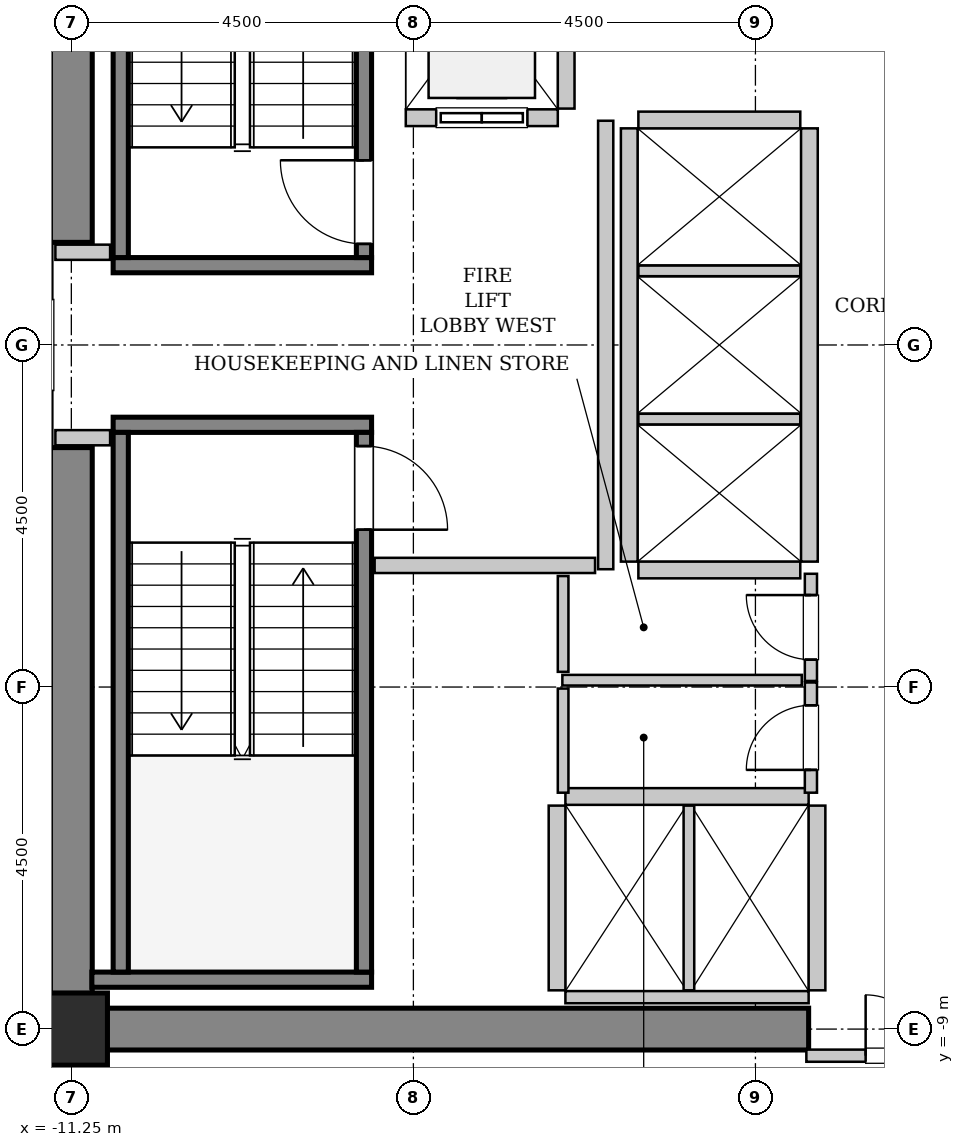
"""IFC4 building model, lengths in metres.
Left out: names, types, materials, properties, quantities, classifications, styles, units other than length and angle.
Written with IfcOpenShell. Run it as: python <this file> out.ifc"""

import sys

from ifc_helpers import new_model, si_unit, direction, frame, frame_2d, origin, origin_2d, place, context, subcontext, project, spatial, rectangle, hollow_rectangle, extrude, source, transform, mapped, element, fill, save


model = new_model("IFC4")
c1 = context("Model", 3, precision=1e-05, world=origin(), true_north=direction((0.0, 1.0)))
c2 = subcontext(c1, "Body", "Model", "MODEL_VIEW")
j1 = project(units=[si_unit("LENGTHUNIT", "METRE"), si_unit("PLANEANGLEUNIT", "RADIAN")], contexts=[c1])
p1 = place(None, origin())
s1 = spatial("IfcSite", under=j1, at=p1, CompositionType="ELEMENT")
p2 = place(p1, origin())
s2 = spatial("IfcBuilding", under=s1, at=p2, CompositionType="ELEMENT")
p3 = place(p2, frame((0.0, 0.0, 94.6)))
s3 = spatial("IfcBuildingStorey", under=s2, at=p3, CompositionType="ELEMENT", Elevation=94.6)
m1 = source(origin(), c2, "Body", "SweptSolid", [
    extrude(rectangle(XDim=9.975, YDim=0.55, at=frame_2d((4.987, 0.0))), origin(), (0.0, 0.0, 1.0), 3.8),
])
p4 = place(p3, frame((-11.525, -9.0, 0.0), z_axis=(0.0, 0.0, 1.0), x_axis=(1.0, 0.0, 0.0)))
e1 = element("IfcWall", 1, at=p4, inside=s3, PredefinedType="SHEAR", context=c2, shape_type="MappedRepresentation", body=[
    mapped(m1, transform((0.0, 0.0, 0.0), x_axis=(1.0, 0.0, 0.0), y_axis=(0.0, 1.0, 0.0), z_axis=(0.0, 0.0, 1.0), scale=1.0)),
])
m2 = source(origin(), c2, "Body", "SweptSolid", [
    extrude(rectangle(XDim=7.375, YDim=0.55, at=frame_2d((3.688, 0.0))), origin(), (0.0, 0.0, 1.0), 3.8),
])
for number, where, z_axis, x_axis in (
    (2, (-11.25, -8.725, 0.0), (0.0, 0.0, 1.0), (0.0, 1.0, 0.0)),
    (3, (-11.25, 1.35, 0.0), (0.0, 0.0, 1.0), (0.0, 1.0, 0.0)),
):
    element("IfcWall", number, at=place(p3, frame(where, z_axis=z_axis, x_axis=x_axis)), inside=s3, PredefinedType="SHEAR", context=c2, shape_type="MappedRepresentation", body=[
        mapped(m2, transform((0.0, 0.0, 0.0), x_axis=(1.0, 0.0, 0.0), y_axis=(0.0, 1.0, 0.0), z_axis=(0.0, 0.0, 1.0), scale=1.0)),
    ])
m3 = source(origin(), c2, "Body", "SweptSolid", [
    extrude(hollow_rectangle(XDim=0.95, YDim=0.95, WallThickness=0.045, InnerFilletRadius=0.045, OuterFilletRadius=0.09, at=origin_2d()), origin(), (0.0, 0.0, 1.0), 3.8),
])
p5 = place(p3, frame((-11.25, -9.0, 0.0), z_axis=(0.0, 0.0, 1.0), x_axis=(1.0, 0.0, 0.0)))
e4 = element("IfcColumn", 4, at=p5, inside=s3, PredefinedType="COLUMN", context=c2, shape_type="MappedRepresentation", body=[
    mapped(m3, transform((0.0, 0.0, 0.0), x_axis=(1.0, 0.0, 0.0), y_axis=(0.0, 1.0, 0.0), z_axis=(0.0, 0.0, 1.0), scale=1.0)),
])
m4 = source(origin(), c2, "Body", "SweptSolid", [
    extrude(rectangle(XDim=3.4, YDim=0.2, at=frame_2d((1.7, 0.0))), origin(), (0.0, 0.0, 1.0), 3.8),
])
p6 = place(p3, frame((-7.3, 1.05, 0.0), z_axis=(0.0, 0.0, 1.0), x_axis=(-1.0, 0.0, 0.0)))
e5 = element("IfcWall", 5, at=p6, inside=s3, PredefinedType="SOLIDWALL", context=c2, shape_type="MappedRepresentation", body=[
    mapped(m4, transform((0.0, 0.0, 0.0), x_axis=(1.0, 0.0, 0.0), y_axis=(0.0, 1.0, 0.0), z_axis=(0.0, 0.0, 1.0), scale=1.0)),
])
m5 = source(origin(), c2, "Body", "SweptSolid", [
    extrude(rectangle(XDim=7.1, YDim=0.2, at=frame_2d((3.55, 0.0))), origin(), (0.0, 0.0, 1.0), 3.8),
])
p7 = place(p3, frame((-7.4, 1.15, 0.0), z_axis=(0.0, 0.0, 1.0), x_axis=(0.0, 1.0, 0.0)))
e6 = element("IfcWall", 6, at=p7, inside=s3, PredefinedType="SOLIDWALL", context=c2, shape_type="MappedRepresentation", body=[
    mapped(m5, transform((0.0, 0.0, 0.0), x_axis=(1.0, 0.0, 0.0), y_axis=(0.0, 1.0, 0.0), z_axis=(0.0, 0.0, 1.0), scale=1.0)),
])
p8 = place(p7, frame((0.18, 0.0, 0.0)))
e7 = element("IfcOpeningElement", 7, at=p8, cuts=e6, PredefinedType="OPENING", context=c2, shape_type="SweptSolid", body=[
    extrude(rectangle(XDim=1.1, YDim=2.15, at=frame_2d((0.55, 1.075))), frame((0.0, 0.11, 0.0), z_axis=(0.0, -1.0, 0.0), x_axis=(1.0, 0.0, 0.0)), (0.0, 0.0, 1.0), 0.22),
])
p9 = place(p3, frame((-10.6, 1.15, 0.0), z_axis=(0.0, 0.0, 1.0), x_axis=(0.0, 1.0, 0.0)))
e8 = element("IfcWall", 8, at=p9, inside=s3, PredefinedType="SOLIDWALL", context=c2, shape_type="MappedRepresentation", body=[
    mapped(m5, transform((0.0, 0.0, 0.0), x_axis=(1.0, 0.0, 0.0), y_axis=(0.0, 1.0, 0.0), z_axis=(0.0, 0.0, 1.0), scale=1.0)),
])
p10 = place(p3, frame((-10.7, -1.05, 0.0), z_axis=(0.0, 0.0, 1.0), x_axis=(1.0, 0.0, 0.0)))
e9 = element("IfcWall", 9, at=p10, inside=s3, PredefinedType="SOLIDWALL", context=c2, shape_type="MappedRepresentation", body=[
    mapped(m4, transform((0.0, 0.0, 0.0), x_axis=(1.0, 0.0, 0.0), y_axis=(0.0, 1.0, 0.0), z_axis=(0.0, 0.0, 1.0), scale=1.0)),
])
m6 = source(origin(), c2, "Body", "SweptSolid", [
    extrude(rectangle(XDim=3.68, YDim=0.2, at=frame_2d((1.84, 0.0))), origin(), (0.0, 0.0, 1.0), 3.8),
])
p11 = place(p3, frame((-10.98, -8.35, 0.0), z_axis=(0.0, 0.0, 1.0), x_axis=(1.0, 0.0, 0.0)))
e10 = element("IfcWall", 10, at=p11, inside=s3, PredefinedType="SOLIDWALL", context=c2, shape_type="MappedRepresentation", body=[
    mapped(m6, transform((0.0, 0.0, 0.0), x_axis=(1.0, 0.0, 0.0), y_axis=(0.0, 1.0, 0.0), z_axis=(0.0, 0.0, 1.0), scale=1.0)),
])
p12 = place(p3, frame((-10.6, -1.15, 0.0), z_axis=(0.0, 0.0, 1.0), x_axis=(0.0, -1.0, 0.0)))
e11 = element("IfcWall", 11, at=p12, inside=s3, PredefinedType="SOLIDWALL", context=c2, shape_type="MappedRepresentation", body=[
    mapped(m5, transform((0.0, 0.0, 0.0), x_axis=(1.0, 0.0, 0.0), y_axis=(0.0, 1.0, 0.0), z_axis=(0.0, 0.0, 1.0), scale=1.0)),
])
p13 = place(p3, frame((-7.4, -1.15, 0.0), z_axis=(0.0, 0.0, 1.0), x_axis=(0.0, -1.0, 0.0)))
e12 = element("IfcWall", 12, at=p13, inside=s3, PredefinedType="SOLIDWALL", context=c2, shape_type="MappedRepresentation", body=[
    mapped(m5, transform((0.0, 0.0, 0.0), x_axis=(1.0, 0.0, 0.0), y_axis=(0.0, 1.0, 0.0), z_axis=(0.0, 0.0, 1.0), scale=1.0)),
])
p14 = place(p13, frame((0.18, 0.0, 0.0)))
e13 = element("IfcOpeningElement", 13, at=p14, cuts=e12, PredefinedType="OPENING", context=c2, shape_type="SweptSolid", body=[
    extrude(rectangle(XDim=1.1, YDim=2.15, at=frame_2d((0.55, 1.075))), frame((0.0, 0.11, 0.0), z_axis=(0.0, -1.0, 0.0), x_axis=(1.0, 0.0, 0.0)), (0.0, 0.0, 1.0), 0.22),
])
m7 = source(origin(), c2, "Body", "SweptSolid", [
    extrude(rectangle(XDim=2.0, YDim=0.22, at=frame_2d((1.0, 0.0))), origin(), (0.0, 0.0, 1.0), 3.535),
])
p15 = place(p3, frame((-6.85, 2.99, 0.0), z_axis=(0.0, 0.0, 1.0), x_axis=(1.0, 0.0, 0.0)))
e14 = element("IfcWall", 14, at=p15, inside=s3, PredefinedType="SOLIDWALL", context=c2, shape_type="MappedRepresentation", body=[
    mapped(m7, transform((0.0, 0.0, 0.0), x_axis=(1.0, 0.0, 0.0), y_axis=(0.0, 1.0, 0.0), z_axis=(0.0, 0.0, 1.0), scale=1.0)),
])
p16 = place(p15, frame((0.4, 0.0, 0.0)))
e15 = element("IfcOpeningElement", 15, at=p16, cuts=e14, PredefinedType="OPENING", context=c2, shape_type="SweptSolid", body=[
    extrude(rectangle(XDim=1.2, YDim=2.2, at=frame_2d((0.6, 1.1))), frame((0.0, 0.12, 0.0), z_axis=(0.0, -1.0, 0.0), x_axis=(1.0, 0.0, 0.0)), (0.0, 0.0, 1.0), 0.24),
])
m8 = source(origin(), c2, "Body", "SweptSolid", [
    extrude(rectangle(XDim=2.68, YDim=0.22, at=frame_2d((1.34, 0.0))), origin(), (0.0, 0.0, 1.0), 3.535),
])
p17 = place(p3, frame((-4.74, 3.11, 0.0), z_axis=(0.0, 0.0, 1.0), x_axis=(0.0, 1.0, 0.0)))
e16 = element("IfcWall", 16, at=p17, inside=s3, PredefinedType="SOLIDWALL", context=c2, shape_type="MappedRepresentation", body=[
    mapped(m8, transform((0.0, 0.0, 0.0), x_axis=(1.0, 0.0, 0.0), y_axis=(0.0, 1.0, 0.0), z_axis=(0.0, 0.0, 1.0), scale=1.0)),
])
m9 = source(origin(), c2, "Body", "SweptSolid", [
    extrude(rectangle(XDim=3.2, YDim=0.22, at=frame_2d((1.6, 0.0))), origin(), (0.0, 0.0, 1.0), 3.535),
])
p18 = place(p3, frame((-1.55, -5.94, 0.0), z_axis=(0.0, 0.0, 1.0), x_axis=(-1.0, 0.0, 0.0)))
e17 = element("IfcWall", 17, at=p18, inside=s3, PredefinedType="SOLIDWALL", context=c2, shape_type="MappedRepresentation", body=[
    mapped(m9, transform((0.0, 0.0, 0.0), x_axis=(1.0, 0.0, 0.0), y_axis=(0.0, 1.0, 0.0), z_axis=(0.0, 0.0, 1.0), scale=1.0)),
])
m10 = source(origin(), c2, "Body", "SweptSolid", [
    extrude(rectangle(XDim=3.2, YDim=0.16, at=frame_2d((1.6, 0.0))), origin(), (0.0, 0.0, 1.0), 2.425),
])
p19 = place(p3, frame((-4.75, -8.58, 0.0), z_axis=(0.0, 0.0, 1.0), x_axis=(1.0, 0.0, 0.0)))
e18 = element("IfcWall", 18, at=p19, inside=s3, PredefinedType="PARTITIONING", context=c2, shape_type="MappedRepresentation", body=[
    mapped(m10, transform((0.0, 0.0, 0.0), x_axis=(1.0, 0.0, 0.0), y_axis=(0.0, 1.0, 0.0), z_axis=(0.0, 0.0, 1.0), scale=1.0)),
])
m11 = source(origin(), c2, "Body", "SweptSolid", [
    extrude(rectangle(XDim=2.43, YDim=0.22, at=frame_2d((1.215, 0.0))), origin(), (0.0, 0.0, 1.0), 3.535),
])
p20 = place(p3, frame((-4.86, -6.06, 0.0), z_axis=(0.0, 0.0, 1.0), x_axis=(0.0, -1.0, 0.0)))
e19 = element("IfcWall", 19, at=p20, inside=s3, PredefinedType="SOLIDWALL", context=c2, shape_type="MappedRepresentation", body=[
    mapped(m11, transform((0.0, 0.0, 0.0), x_axis=(1.0, 0.0, 0.0), y_axis=(0.0, 1.0, 0.0), z_axis=(0.0, 0.0, 1.0), scale=1.0)),
])
m12 = source(origin(), c2, "Body", "SweptSolid", [
    extrude(rectangle(XDim=2.43, YDim=0.14, at=frame_2d((1.215, 0.0))), origin(), (0.0, 0.0, 1.0), 3.535),
])
p21 = place(p3, frame((-3.125, -8.49, 0.0), z_axis=(0.0, 0.0, 1.0), x_axis=(0.0, 1.0, 0.0)))
e20 = element("IfcWall", 20, at=p21, inside=s3, PredefinedType="PARTITIONING", context=c2, shape_type="MappedRepresentation", body=[
    mapped(m12, transform((0.0, 0.0, 0.0), x_axis=(1.0, 0.0, 0.0), y_axis=(0.0, 1.0, 0.0), z_axis=(0.0, 0.0, 1.0), scale=1.0)),
])
p22 = place(p3, frame((-1.44, -8.49, 0.0), z_axis=(0.0, 0.0, 1.0), x_axis=(0.0, 1.0, 0.0)))
e21 = element("IfcWall", 21, at=p22, inside=s3, PredefinedType="SOLIDWALL", context=c2, shape_type="MappedRepresentation", body=[
    mapped(m11, transform((0.0, 0.0, 0.0), x_axis=(1.0, 0.0, 0.0), y_axis=(0.0, 1.0, 0.0), z_axis=(0.0, 0.0, 1.0), scale=1.0)),
])
m13 = source(origin(), c2, "Body", "SweptSolid", [
    extrude(rectangle(XDim=5.7, YDim=0.22, at=frame_2d((2.85, 0.0))), origin(), (0.0, 0.0, 1.0), 3.535),
])
for number, where, z_axis, x_axis in (
    (22, (-1.54, -2.85, 0.0), (0.0, 0.0, 1.0), (0.0, 1.0, 0.0)),
    (23, (-3.91, 2.85, 0.0), (0.0, 0.0, 1.0), (0.0, -1.0, 0.0)),
):
    element("IfcWall", number, at=place(p3, frame(where, z_axis=z_axis, x_axis=x_axis)), inside=s3, PredefinedType="SOLIDWALL", context=c2, shape_type="MappedRepresentation", body=[
        mapped(m13, transform((0.0, 0.0, 0.0), x_axis=(1.0, 0.0, 0.0), y_axis=(0.0, 1.0, 0.0), z_axis=(0.0, 0.0, 1.0), scale=1.0)),
    ])
m14 = source(origin(), c2, "Body", "SweptSolid", [
    extrude(rectangle(XDim=2.13, YDim=0.22, at=frame_2d((1.065, 0.0))), origin(), (0.0, 0.0, 1.0), 3.535),
])
p23 = place(p3, frame((-3.79, -2.96, 0.0), z_axis=(0.0, 0.0, 1.0), x_axis=(1.0, 0.0, 0.0)))
e24 = element("IfcWall", 24, at=p23, inside=s3, PredefinedType="SOLIDWALL", context=c2, shape_type="MappedRepresentation", body=[
    mapped(m14, transform((0.0, 0.0, 0.0), x_axis=(1.0, 0.0, 0.0), y_axis=(0.0, 1.0, 0.0), z_axis=(0.0, 0.0, 1.0), scale=1.0)),
])
m15 = source(origin(), c2, "Body", "SweptSolid", [
    extrude(rectangle(XDim=2.13, YDim=0.14, at=frame_2d((1.065, 0.0))), origin(), (0.0, 0.0, 1.0), 3.535),
])
for number, where, z_axis, x_axis in (
    (25, (-3.79, -0.975, 0.0), (0.0, 0.0, 1.0), (1.0, 0.0, 0.0)),
    (26, (-3.79, 0.975, 0.0), (0.0, 0.0, 1.0), (1.0, 0.0, 0.0)),
):
    element("IfcWall", number, at=place(p3, frame(where, z_axis=z_axis, x_axis=x_axis)), inside=s3, PredefinedType="PARTITIONING", context=c2, shape_type="MappedRepresentation", body=[
        mapped(m15, transform((0.0, 0.0, 0.0), x_axis=(1.0, 0.0, 0.0), y_axis=(0.0, 1.0, 0.0), z_axis=(0.0, 0.0, 1.0), scale=1.0)),
    ])
p24 = place(p3, frame((-1.66, 2.96, 0.0), z_axis=(0.0, 0.0, 1.0), x_axis=(-1.0, 0.0, 0.0)))
e27 = element("IfcWall", 27, at=p24, inside=s3, PredefinedType="SOLIDWALL", context=c2, shape_type="MappedRepresentation", body=[
    mapped(m14, transform((0.0, 0.0, 0.0), x_axis=(1.0, 0.0, 0.0), y_axis=(0.0, 1.0, 0.0), z_axis=(0.0, 0.0, 1.0), scale=1.0)),
])
m16 = source(origin(), c2, "Body", "SweptSolid", [
    extrude(rectangle(XDim=5.9, YDim=0.2, at=frame_2d((2.95, 0.0))), origin(), (0.0, 0.0, 1.0), 3.535),
])
p25 = place(p3, frame((-4.22, -2.95, 0.0), z_axis=(0.0, 0.0, 1.0), x_axis=(0.0, 1.0, 0.0)))
e28 = element("IfcWall", 28, at=p25, inside=s3, PredefinedType="PARTITIONING", context=c2, shape_type="MappedRepresentation", body=[
    mapped(m16, transform((0.0, 0.0, 0.0), x_axis=(1.0, 0.0, 0.0), y_axis=(0.0, 1.0, 0.0), z_axis=(0.0, 0.0, 1.0), scale=1.0)),
])
m17 = source(origin(), c2, "Body", "SweptSolid", [
    extrude(rectangle(XDim=2.9, YDim=0.2, at=frame_2d((1.45, 0.0))), origin(), (0.0, 0.0, 1.0), 3.535),
])
p26 = place(p3, frame((-7.26, -2.9, 0.0), z_axis=(0.0, 0.0, 1.0), x_axis=(1.0, 0.0, 0.0)))
e29 = element("IfcWall", 29, at=p26, inside=s3, PredefinedType="PARTITIONING", context=c2, shape_type="MappedRepresentation", body=[
    mapped(m17, transform((0.0, 0.0, 0.0), x_axis=(1.0, 0.0, 0.0), y_axis=(0.0, 1.0, 0.0), z_axis=(0.0, 0.0, 1.0), scale=1.0)),
])
m18 = source(origin(), c2, "Body", "SweptSolid", [
    extrude(rectangle(XDim=0.72, YDim=0.2, at=frame_2d((0.36, 0.0))), origin(), (0.0, 0.0, 1.0), 3.535),
])
for number, where, z_axis, x_axis in (
    (30, (-11.46, 1.22, 0.0), (0.0, 0.0, 1.0), (1.0, 0.0, 0.0)),
    (31, (-11.46, -1.22, 0.0), (0.0, 0.0, 1.0), (1.0, 0.0, 0.0)),
):
    element("IfcWall", number, at=place(p3, frame(where, z_axis=z_axis, x_axis=x_axis)), inside=s3, PredefinedType="PARTITIONING", context=c2, shape_type="MappedRepresentation", body=[
        mapped(m18, transform((0.0, 0.0, 0.0), x_axis=(1.0, 0.0, 0.0), y_axis=(0.0, 1.0, 0.0), z_axis=(0.0, 0.0, 1.0), scale=1.0)),
    ])
m19 = source(origin(), c2, "Body", "SweptSolid", [
    extrude(rectangle(XDim=3.16, YDim=0.16, at=frame_2d((1.58, 0.0))), origin(), (0.0, 0.0, 1.0), 2.425),
])
p27 = place(p3, frame((-1.58, -9.35, 0.0), z_axis=(0.0, 0.0, 1.0), x_axis=(1.0, 0.0, 0.0)))
e32 = element("IfcWall", 32, at=p27, inside=s3, PredefinedType="PARTITIONING", context=c2, shape_type="MappedRepresentation", body=[
    mapped(m19, transform((0.0, 0.0, 0.0), x_axis=(1.0, 0.0, 0.0), y_axis=(0.0, 1.0, 0.0), z_axis=(0.0, 0.0, 1.0), scale=1.0)),
])
p28 = place(p27, frame((0.78, 0.0, 0.0)))
e33 = element("IfcOpeningElement", 33, at=p28, cuts=e32, PredefinedType="OPENING", context=c2, shape_type="SweptSolid", body=[
    extrude(rectangle(XDim=1.6, YDim=2.3, at=frame_2d((0.8, 1.15))), frame((0.0, 0.09, 0.0), z_axis=(0.0, -1.0, 0.0), x_axis=(1.0, 0.0, 0.0)), (0.0, 0.0, 1.0), 0.18),
])
m20 = source(origin(), c2, "Body", "SweptSolid", [
    extrude(rectangle(XDim=1.41, YDim=0.16, at=frame_2d((0.705, 0.0))), origin(), (0.0, 0.0, 1.0), 3.535),
])
p29 = place(p3, frame((-1.52, -4.42, 0.0), z_axis=(0.0, 0.0, 1.0), x_axis=(0.0, 1.0, 0.0)))
e34 = element("IfcWall", 34, at=p29, inside=s3, PredefinedType="PARTITIONING", context=c2, shape_type="MappedRepresentation", body=[
    mapped(m20, transform((0.0, 0.0, 0.0), x_axis=(1.0, 0.0, 0.0), y_axis=(0.0, 1.0, 0.0), z_axis=(0.0, 0.0, 1.0), scale=1.0)),
])
p30 = place(p29, frame((0.28, 0.0, 0.0)))
e35 = element("IfcOpeningElement", 35, at=p30, cuts=e34, PredefinedType="OPENING", context=c2, shape_type="SweptSolid", body=[
    extrude(rectangle(XDim=0.85, YDim=2.1, at=frame_2d((0.425, 1.05))), frame((0.0, 0.09, 0.0), z_axis=(0.0, -1.0, 0.0), x_axis=(1.0, 0.0, 0.0)), (0.0, 0.0, 1.0), 0.18),
])
m21 = source(origin(), c2, "Body", "SweptSolid", [
    extrude(rectangle(XDim=3.15, YDim=0.14, at=frame_2d((1.575, 0.0))), origin(), (0.0, 0.0, 1.0), 3.535),
])
p31 = place(p3, frame((-4.79, -4.41, 0.0), z_axis=(0.0, 0.0, 1.0), x_axis=(1.0, 0.0, 0.0)))
e36 = element("IfcWall", 36, at=p31, inside=s3, PredefinedType="PARTITIONING", context=c2, shape_type="MappedRepresentation", body=[
    mapped(m21, transform((0.0, 0.0, 0.0), x_axis=(1.0, 0.0, 0.0), y_axis=(0.0, 1.0, 0.0), z_axis=(0.0, 0.0, 1.0), scale=1.0)),
])
m22 = source(origin(), c2, "Body", "SweptSolid", [
    extrude(rectangle(XDim=1.26, YDim=0.14, at=frame_2d((0.63, 0.0))), origin(), (0.0, 0.0, 1.0), 3.535),
])
p32 = place(p3, frame((-4.78, -4.3, 0.0), z_axis=(0.0, 0.0, 1.0), x_axis=(0.0, 1.0, 0.0)))
e37 = element("IfcWall", 37, at=p32, inside=s3, PredefinedType="PARTITIONING", context=c2, shape_type="MappedRepresentation", body=[
    mapped(m22, transform((0.0, 0.0, 0.0), x_axis=(1.0, 0.0, 0.0), y_axis=(0.0, 1.0, 0.0), z_axis=(0.0, 0.0, 1.0), scale=1.0)),
])
m23 = source(origin(), c2, "Body", "SweptSolid", [
    extrude(rectangle(XDim=1.45, YDim=0.16, at=frame_2d((0.725, 0.0))), origin(), (0.0, 0.0, 1.0), 3.535),
])
p33 = place(p3, frame((-1.52, -5.89, 0.0), z_axis=(0.0, 0.0, 1.0), x_axis=(0.0, 1.0, 0.0)))
e38 = element("IfcWall", 38, at=p33, inside=s3, PredefinedType="PARTITIONING", context=c2, shape_type="MappedRepresentation", body=[
    mapped(m23, transform((0.0, 0.0, 0.0), x_axis=(1.0, 0.0, 0.0), y_axis=(0.0, 1.0, 0.0), z_axis=(0.0, 0.0, 1.0), scale=1.0)),
])
p34 = place(p33, frame((0.3, 0.0, 0.0)))
e39 = element("IfcOpeningElement", 39, at=p34, cuts=e38, PredefinedType="OPENING", context=c2, shape_type="SweptSolid", body=[
    extrude(rectangle(XDim=0.85, YDim=2.1, at=frame_2d((0.425, 1.05))), frame((0.0, 0.09, 0.0), z_axis=(0.0, -1.0, 0.0), x_axis=(1.0, 0.0, 0.0)), (0.0, 0.0, 1.0), 0.18),
])
m24 = source(origin(), c2, "Body", "SweptSolid", [
    extrude(rectangle(XDim=1.37, YDim=0.14, at=frame_2d((0.685, 0.0))), origin(), (0.0, 0.0, 1.0), 3.535),
])
p35 = place(p3, frame((-4.78, -5.89, 0.0), z_axis=(0.0, 0.0, 1.0), x_axis=(0.0, 1.0, 0.0)))
e40 = element("IfcWall", 40, at=p35, inside=s3, PredefinedType="PARTITIONING", context=c2, shape_type="MappedRepresentation", body=[
    mapped(m24, transform((0.0, 0.0, 0.0), x_axis=(1.0, 0.0, 0.0), y_axis=(0.0, 1.0, 0.0), z_axis=(0.0, 0.0, 1.0), scale=1.0)),
])
m25 = source(origin(), c2, "Body", "SweptSolid", [
    extrude(rectangle(XDim=1.1, YDim=2.15, at=frame_2d((0.55, 1.075))), frame((0.0, 0.025, 0.0), z_axis=(0.0, -1.0, 0.0), x_axis=(1.0, 0.0, 0.0)), (0.0, 0.0, 1.0), 0.05),
])
p36 = place(p8, origin())
e41 = element("IfcDoor", 41, at=p36, inside=s3, OperationType="SINGLE_SWING_RIGHT", PredefinedType="DOOR", context=c2, shape_type="MappedRepresentation", body=[
    mapped(m25, transform((0.0, 0.0, 0.0), x_axis=(1.0, 0.0, 0.0), y_axis=(0.0, 1.0, 0.0), z_axis=(0.0, 0.0, 1.0), scale=1.0)),
])
fill(e7, e41)
p37 = place(p14, origin())
e42 = element("IfcDoor", 42, at=p37, inside=s3, OperationType="SINGLE_SWING_RIGHT", PredefinedType="DOOR", context=c2, shape_type="MappedRepresentation", body=[
    mapped(m25, transform((0.0, 0.0, 0.0), x_axis=(1.0, 0.0, 0.0), y_axis=(0.0, 1.0, 0.0), z_axis=(0.0, 0.0, 1.0), scale=1.0)),
])
fill(e13, e42)
m26 = source(origin(), c2, "Body", "SweptSolid", [
    extrude(rectangle(XDim=1.2, YDim=2.2, at=frame_2d((0.6, 1.1))), frame((0.0, 0.025, 0.0), z_axis=(0.0, -1.0, 0.0), x_axis=(1.0, 0.0, 0.0)), (0.0, 0.0, 1.0), 0.05),
])
p38 = place(p16, origin())
e43 = element("IfcDoor", 43, at=p38, inside=s3, OperationType="SLIDING_TO_LEFT", PredefinedType="DOOR", context=c2, shape_type="MappedRepresentation", body=[
    mapped(m26, transform((0.0, 0.0, 0.0), x_axis=(1.0, 0.0, 0.0), y_axis=(0.0, 1.0, 0.0), z_axis=(0.0, 0.0, 1.0), scale=1.0)),
])
fill(e15, e43)
m27 = source(origin(), c2, "Body", "SweptSolid", [
    extrude(rectangle(XDim=1.6, YDim=2.3, at=frame_2d((0.8, 1.15))), frame((0.0, 0.025, 0.0), z_axis=(0.0, -1.0, 0.0), x_axis=(1.0, 0.0, 0.0)), (0.0, 0.0, 1.0), 0.05),
])
p39 = place(p28, origin())
e44 = element("IfcDoor", 44, at=p39, inside=s3, OperationType="DOUBLE_DOOR_SINGLE_SWING", PredefinedType="DOOR", context=c2, shape_type="MappedRepresentation", body=[
    mapped(m27, transform((0.0, 0.0, 0.0), x_axis=(1.0, 0.0, 0.0), y_axis=(0.0, 1.0, 0.0), z_axis=(0.0, 0.0, 1.0), scale=1.0)),
])
fill(e33, e44)
m28 = source(origin(), c2, "Body", "SweptSolid", [
    extrude(rectangle(XDim=0.85, YDim=2.1, at=frame_2d((0.425, 1.05))), frame((0.0, 0.025, 0.0), z_axis=(0.0, -1.0, 0.0), x_axis=(1.0, 0.0, 0.0)), (0.0, 0.0, 1.0), 0.05),
])
p40 = place(p30, origin())
e45 = element("IfcDoor", 45, at=p40, inside=s3, OperationType="SINGLE_SWING_RIGHT", PredefinedType="DOOR", context=c2, shape_type="MappedRepresentation", body=[
    mapped(m28, transform((0.0, 0.0, 0.0), x_axis=(1.0, 0.0, 0.0), y_axis=(0.0, 1.0, 0.0), z_axis=(0.0, 0.0, 1.0), scale=1.0)),
])
fill(e35, e45)
p41 = place(p34, origin())
e46 = element("IfcDoor", 46, at=p41, inside=s3, OperationType="SINGLE_SWING_LEFT", PredefinedType="DOOR", context=c2, shape_type="MappedRepresentation", body=[
    mapped(m28, transform((0.0, 0.0, 0.0), x_axis=(1.0, 0.0, 0.0), y_axis=(0.0, 1.0, 0.0), z_axis=(0.0, 0.0, 1.0), scale=1.0)),
])
fill(e39, e46)
save(model, sys.argv[1])
